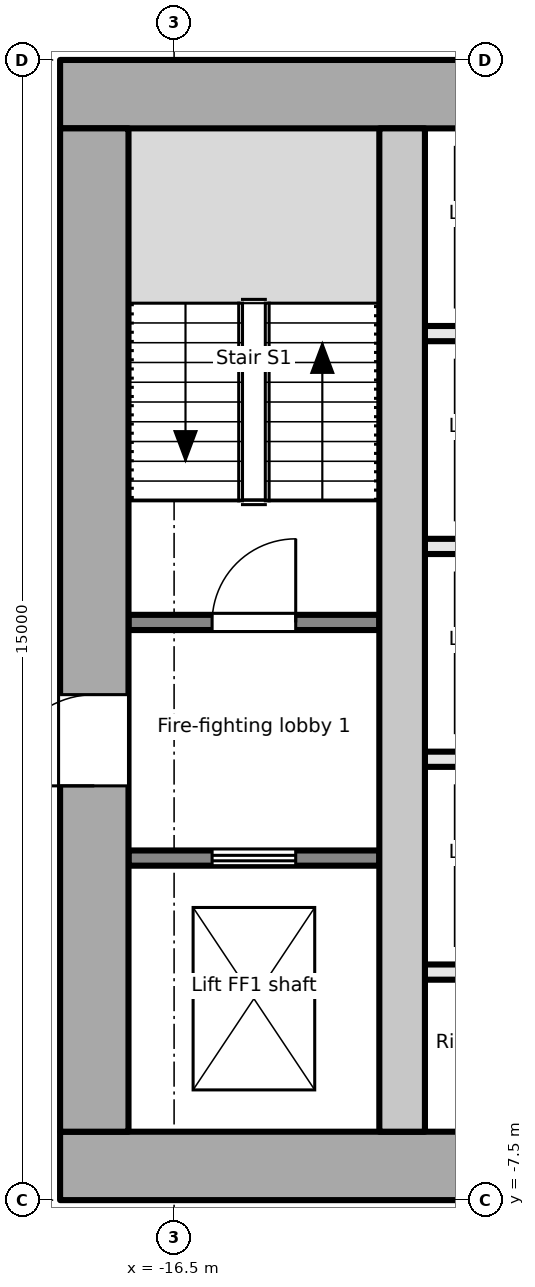
"""IFC4 building model, lengths in metres.
Left out: names, types, materials, properties, quantities, classifications, styles, units other than length and angle.
Written with IfcOpenShell. Run it as: python <this file> out.ifc"""

import sys

from ifc_helpers import new_model, si_unit, direction, frame, frame_2d, origin, place, context, subcontext, project, spatial, rectangle, extrude, element, fill, save


model = new_model("IFC4")
c1 = context("Model", 3, precision=1e-05, world=origin(), true_north=direction((0.0, 1.0)))
c2 = subcontext(c1, "Body", "Model", "MODEL_VIEW")
j1 = project(units=[si_unit("LENGTHUNIT", "METRE"), si_unit("PLANEANGLEUNIT", "RADIAN")], contexts=[c1])
p1 = place(None, origin())
s1 = spatial("IfcSite", under=j1, at=p1, CompositionType="ELEMENT")
p2 = place(p1, origin())
s2 = spatial("IfcBuilding", under=s1, at=p2, CompositionType="ELEMENT")
p3 = place(p2, frame((0.0, 0.0, 44.7)))
s3 = spatial("IfcBuildingStorey", under=s2, at=p3, CompositionType="ELEMENT", Elevation=44.7)
p4 = place(p3, frame((-18.0, -7.05, -0.2), z_axis=(0.0, 0.0, 1.0), x_axis=(1.0, 0.0, 0.0)))
e1 = element("IfcWall", 1, at=p4, inside=s3, PredefinedType="SHEAR", context=c2, shape_type="SweptSolid", body=[
    extrude(rectangle(XDim=36.0, YDim=0.9, at=frame_2d((18.0, 0.0))), origin(), (0.0, 0.0, 1.0), 4.1),
])
p5 = place(p4, frame((7.8, 0.0, 0.2)))
e2 = element("IfcOpeningElement", 2, at=p5, cuts=e1, PredefinedType="OPENING", context=c2, shape_type="SweptSolid", body=[
    extrude(rectangle(XDim=2.4, YDim=2.1, at=frame_2d((1.2, 1.05))), frame((0.0, 0.46, 0.0), z_axis=(0.0, -1.0, 0.0), x_axis=(1.0, 0.0, 0.0)), (0.0, 0.0, 1.0), 0.921),
])
p6 = place(p4, frame((17.4, 0.0, 0.2)))
e3 = element("IfcOpeningElement", 3, at=p6, cuts=e1, PredefinedType="OPENING", context=c2, shape_type="SweptSolid", body=[
    extrude(rectangle(XDim=1.2, YDim=2.1, at=frame_2d((0.6, 1.05))), frame((0.0, 0.46, 0.0), z_axis=(0.0, -1.0, 0.0), x_axis=(1.0, 0.0, 0.0)), (0.0, 0.0, 1.0), 0.921),
])
p7 = place(p4, frame((26.1, 0.0, 0.2)))
e4 = element("IfcOpeningElement", 4, at=p7, cuts=e1, PredefinedType="OPENING", context=c2, shape_type="SweptSolid", body=[
    extrude(rectangle(XDim=2.4, YDim=2.1, at=frame_2d((1.2, 1.05))), frame((0.0, 0.46, 0.0), z_axis=(0.0, -1.0, 0.0), x_axis=(1.0, 0.0, 0.0)), (0.0, 0.0, 1.0), 0.921),
])
p8 = place(p3, frame((-18.0, 7.05, -0.2), z_axis=(0.0, 0.0, 1.0), x_axis=(1.0, 0.0, 0.0)))
e5 = element("IfcWall", 5, at=p8, inside=s3, PredefinedType="SHEAR", context=c2, shape_type="SweptSolid", body=[
    extrude(rectangle(XDim=36.0, YDim=0.9, at=frame_2d((18.0, 0.0))), origin(), (0.0, 0.0, 1.0), 4.1),
])
p9 = place(p3, frame((-17.55, -6.6, -0.2), z_axis=(0.0, 0.0, 1.0), x_axis=(0.0, 1.0, 0.0)))
e6 = element("IfcWall", 6, at=p9, inside=s3, PredefinedType="SHEAR", context=c2, shape_type="SweptSolid", body=[
    extrude(rectangle(XDim=13.2, YDim=0.9, at=frame_2d((6.6, 0.0))), origin(), (0.0, 0.0, 1.0), 4.1),
])
p10 = place(p9, frame((4.55, 0.0, 0.2)))
e7 = element("IfcOpeningElement", 7, at=p10, cuts=e6, PredefinedType="OPENING", context=c2, shape_type="SweptSolid", body=[
    extrude(rectangle(XDim=1.2, YDim=2.1, at=frame_2d((0.6, 1.05))), frame((0.0, 0.46, 0.0), z_axis=(0.0, -1.0, 0.0), x_axis=(1.0, 0.0, 0.0)), (0.0, 0.0, 1.0), 0.921),
])
p11 = place(p3, frame((-13.5, -6.6, -0.2), z_axis=(0.0, 0.0, 1.0), x_axis=(0.0, 1.0, 0.0)))
e8 = element("IfcWall", 8, at=p11, inside=s3, PredefinedType="SHEAR", context=c2, shape_type="SweptSolid", body=[
    extrude(rectangle(XDim=13.2, YDim=0.6, at=frame_2d((6.6, 0.0))), origin(), (0.0, 0.0, 1.0), 4.1),
])
p12 = place(p3, frame((-17.1, -3.0, 0.0), z_axis=(0.0, 0.0, 1.0), x_axis=(1.0, 0.0, 0.0)))
e9 = element("IfcWall", 9, at=p12, inside=s3, PredefinedType="PARTITIONING", context=c2, shape_type="SweptSolid", body=[
    extrude(rectangle(XDim=3.3, YDim=0.2, at=frame_2d((1.65, 0.0))), origin(), (0.0, 0.0, 1.0), 3.9),
])
p13 = place(p12, frame((1.1, 0.0, 0.0)))
e10 = element("IfcOpeningElement", 10, at=p13, cuts=e9, PredefinedType="OPENING", context=c2, shape_type="SweptSolid", body=[
    extrude(rectangle(XDim=1.1, YDim=2.1, at=frame_2d((0.55, 1.05))), frame((0.0, 0.111, 0.0), z_axis=(0.0, -1.0, 0.0), x_axis=(1.0, 0.0, 0.0)), (0.0, 0.0, 1.0), 0.221),
])
p14 = place(p3, frame((-17.1, 0.1, 0.0), z_axis=(0.0, 0.0, 1.0), x_axis=(1.0, 0.0, 0.0)))
e11 = element("IfcWall", 11, at=p14, inside=s3, PredefinedType="PARTITIONING", context=c2, shape_type="SweptSolid", body=[
    extrude(rectangle(XDim=3.3, YDim=0.2, at=frame_2d((1.65, 0.0))), origin(), (0.0, 0.0, 1.0), 3.9),
])
p15 = place(p14, frame((1.1, 0.0, 0.0)))
e12 = element("IfcOpeningElement", 12, at=p15, cuts=e11, PredefinedType="OPENING", context=c2, shape_type="SweptSolid", body=[
    extrude(rectangle(XDim=1.1, YDim=2.1, at=frame_2d((0.55, 1.05))), frame((0.0, 0.111, 0.0), z_axis=(0.0, -1.0, 0.0), x_axis=(1.0, 0.0, 0.0)), (0.0, 0.0, 1.0), 0.221),
])
for number, where, z_axis, x_axis in (
    (13, (-13.2, -1.7, 0.0), (0.0, 0.0, 1.0), (1.0, 0.0, 0.0)),
    (14, (-13.2, 1.1, 0.0), (0.0, 0.0, 1.0), (1.0, 0.0, 0.0)),
    (15, (-13.2, 3.9, 0.0), (0.0, 0.0, 1.0), (1.0, 0.0, 0.0)),
    (16, (-13.2, -4.5, 0.0), (0.0, 0.0, 1.0), (1.0, 0.0, 0.0)),
):
    element("IfcWall", number, at=place(p3, frame(where, z_axis=z_axis, x_axis=x_axis)), inside=s3, PredefinedType="PARTITIONING", context=c2, shape_type="SweptSolid", body=[
        extrude(rectangle(XDim=2.3, YDim=0.2, at=frame_2d((1.15, 0.0))), origin(), (0.0, 0.0, 1.0), 3.9),
    ])
p16 = place(p13, origin())
e17 = element("IfcDoor", 17, at=p16, inside=s3, OperationType="DOUBLE_DOOR_SLIDING", PredefinedType="DOOR", context=c2, shape_type="SweptSolid", body=[
    extrude(rectangle(XDim=1.1, YDim=2.1, at=frame_2d((0.55, 1.05))), frame((0.0, 0.025, 0.0), z_axis=(0.0, -1.0, 0.0), x_axis=(1.0, 0.0, 0.0)), (0.0, 0.0, 1.0), 0.05),
])
fill(e10, e17)
p17 = place(p10, origin())
e18 = element("IfcDoor", 18, at=p17, inside=s3, OperationType="SINGLE_SWING_LEFT", PredefinedType="DOOR", context=c2, shape_type="SweptSolid", body=[
    extrude(rectangle(XDim=1.2, YDim=2.1, at=frame_2d((0.6, 1.05))), frame((0.0, 0.025, 0.0), z_axis=(0.0, -1.0, 0.0), x_axis=(1.0, 0.0, 0.0)), (0.0, 0.0, 1.0), 0.05),
])
fill(e7, e18)
p18 = place(p15, origin())
e19 = element("IfcDoor", 19, at=p18, inside=s3, OperationType="SINGLE_SWING_RIGHT", PredefinedType="DOOR", context=c2, shape_type="SweptSolid", body=[
    extrude(rectangle(XDim=1.1, YDim=2.1, at=frame_2d((0.55, 1.05))), frame((0.0, 0.025, 0.0), z_axis=(0.0, -1.0, 0.0), x_axis=(1.0, 0.0, 0.0)), (0.0, 0.0, 1.0), 0.05),
])
fill(e12, e19)
save(model, sys.argv[1])
